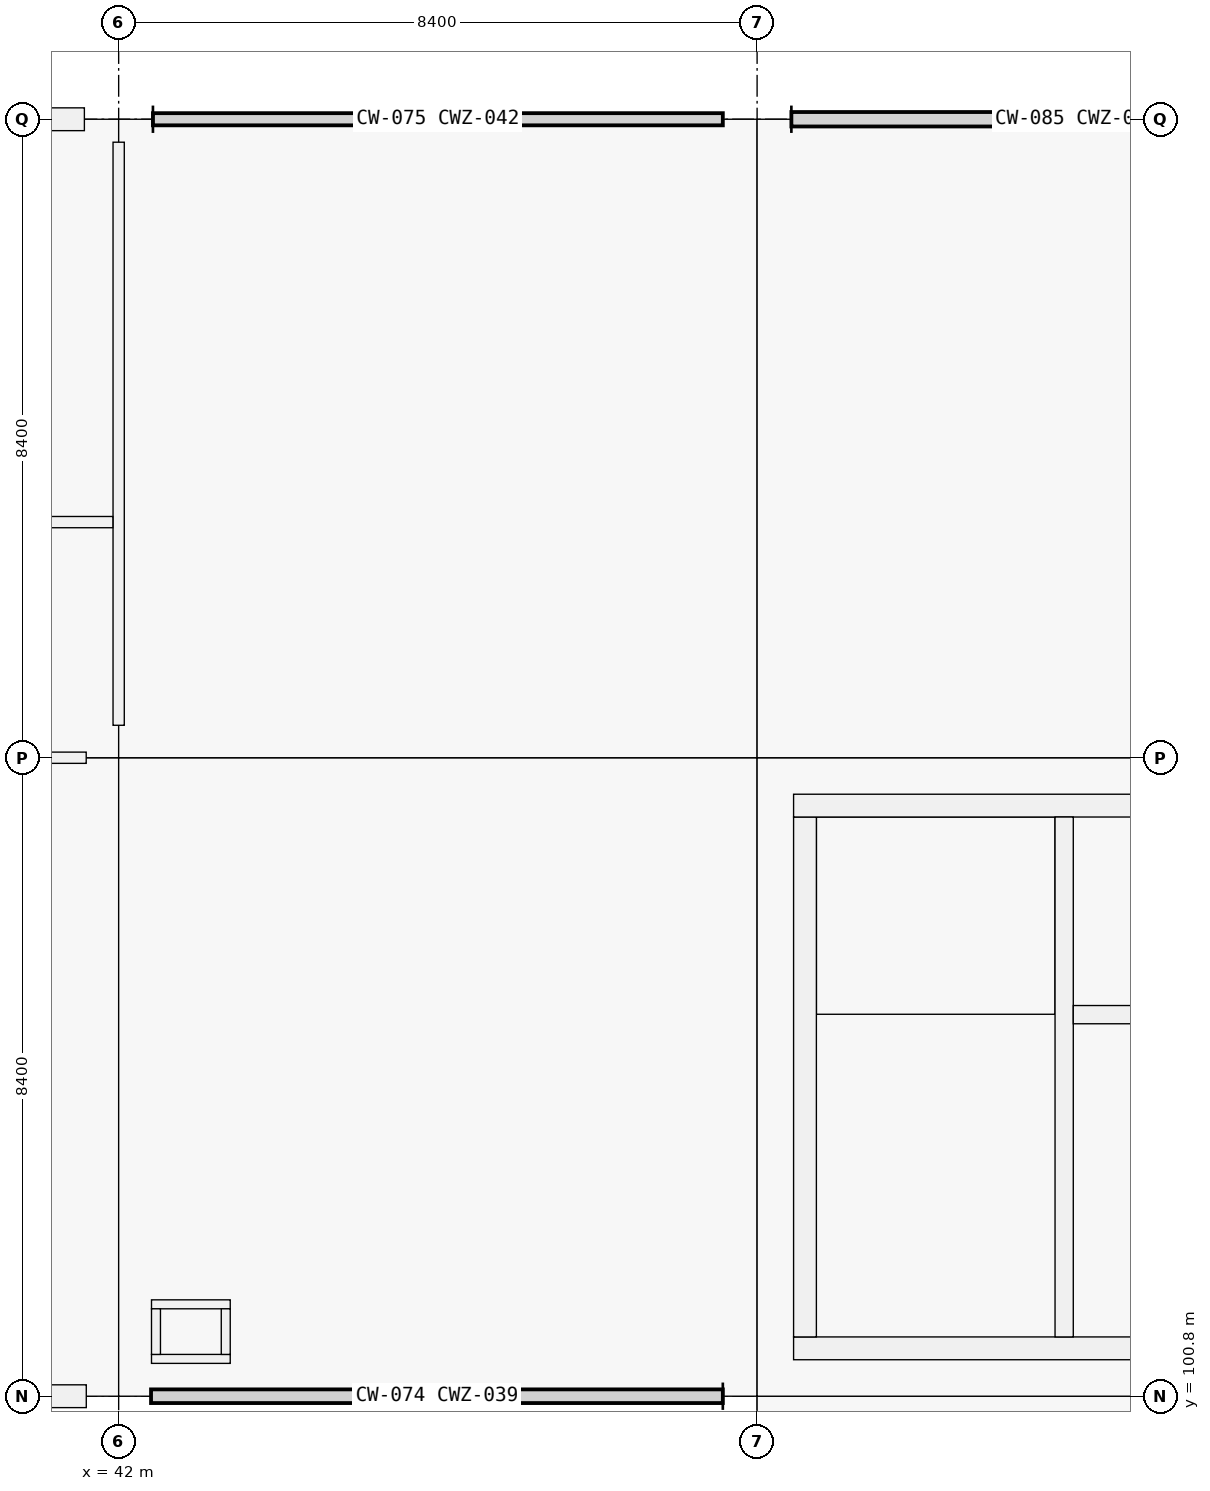
"""IFC4 building model, lengths in metres.
Left out: names, types, materials, properties, quantities, classifications, styles, units other than length and angle.
Written with IfcOpenShell. Run it as: python <this file> out.ifc"""

import sys

from ifc_helpers import new_model, si_unit, direction, frame, frame_2d, origin, origin_2d, place, context, subcontext, project, spatial, rectangle, extrude, element, fill, save


model = new_model("IFC4")
c1 = context("Model", 3, precision=1e-05, world=origin(), true_north=direction((0.0, 1.0)))
c2 = subcontext(c1, "Body", "Model", "MODEL_VIEW")
j1 = project(units=[si_unit("LENGTHUNIT", "METRE"), si_unit("PLANEANGLEUNIT", "RADIAN")], contexts=[c1])
p1 = place(None, origin())
s1 = spatial("IfcSite", under=j1, at=p1, CompositionType="ELEMENT")
p2 = place(p1, origin())
s2 = spatial("IfcBuilding", under=s1, at=p2, CompositionType="ELEMENT")
p3 = place(p2, frame((0.0, 0.0, 5.76)))
s3 = spatial("IfcBuildingStorey", under=s2, at=p3, CompositionType="ELEMENT", Elevation=5.76)
for number, where, z_axis, x_axis in (
    (1, (42.0, 100.8, 0.0), (0.0, 0.0, 1.0), (1.0, 0.0, 0.0)),
    (2, (42.0, 109.2, 0.0), (0.0, 0.0, 1.0), (1.0, 0.0, 0.0)),
):
    element("IfcColumn", number, at=place(p3, frame(where, z_axis=z_axis, x_axis=x_axis)), inside=s3, PredefinedType="COLUMN", context=c2, shape_type="SweptSolid", body=[
        extrude(rectangle(XDim=0.85, YDim=0.85, at=origin_2d()), origin(), (0.0, 0.0, 1.0), 4.5),
    ])
p4 = place(p3, frame((42.0, 117.6, 0.0), z_axis=(0.0, 0.0, 1.0), x_axis=(1.0, 0.0, 0.0)))
e3 = element("IfcColumn", 3, at=p4, inside=s3, PredefinedType="COLUMN", context=c2, shape_type="SweptSolid", body=[
    extrude(rectangle(XDim=0.9, YDim=0.6, at=origin_2d()), origin(), (0.0, 0.0, 1.0), 4.5),
])
for number, where, z_axis, x_axis in (
    (4, (50.4, 100.8, 0.0), (0.0, 0.0, 1.0), (1.0, 0.0, 0.0)),
    (5, (50.4, 109.2, 0.0), (0.0, 0.0, 1.0), (1.0, 0.0, 0.0)),
):
    element("IfcColumn", number, at=place(p3, frame(where, z_axis=z_axis, x_axis=x_axis)), inside=s3, PredefinedType="COLUMN", context=c2, shape_type="SweptSolid", body=[
        extrude(rectangle(XDim=0.9, YDim=0.9, at=origin_2d()), origin(), (0.0, 0.0, 1.0), 4.5),
    ])
p5 = place(p3, frame((50.4, 117.6, 0.0), z_axis=(0.0, 0.0, 1.0), x_axis=(1.0, 0.0, 0.0)))
e6 = element("IfcColumn", 6, at=p5, inside=s3, PredefinedType="COLUMN", context=c2, shape_type="SweptSolid", body=[
    extrude(rectangle(XDim=0.9, YDim=0.6, at=origin_2d()), origin(), (0.0, 0.0, 1.0), 4.5),
])
p6 = place(p3, frame((41.574, 100.8, 0.0), z_axis=(0.0, 0.0, 1.0), x_axis=(-1.0, 0.0, 0.0)))
e7 = element("IfcWall", 7, at=p6, inside=s3, PredefinedType="SOLIDWALL", context=c2, shape_type="SweptSolid", body=[
    extrude(rectangle(XDim=7.598, YDim=0.3, at=frame_2d((3.799, 0.0))), origin(), (0.0, 0.0, 1.0), 3.4),
])
p7 = place(p6, frame((2.824, 0.0, 0.9)))
e8 = element("IfcOpeningElement", 8, at=p7, cuts=e7, PredefinedType="OPENING", context=c2, shape_type="SweptSolid", body=[
    extrude(rectangle(XDim=1.95, YDim=1.6, at=frame_2d((0.975, 0.8))), frame((0.0, 0.15, 0.0), z_axis=(0.0, -1.0, 0.0), x_axis=(1.0, 0.0, 0.0)), (0.0, 0.0, 1.0), 0.3),
])
p8 = place(p3, frame((33.976, 117.6, 0.0), z_axis=(0.0, 0.0, 1.0), x_axis=(1.0, 0.0, 0.0)))
e9 = element("IfcWall", 9, at=p8, inside=s3, PredefinedType="SOLIDWALL", context=c2, shape_type="SweptSolid", body=[
    extrude(rectangle(XDim=7.573, YDim=0.3, at=frame_2d((3.787, 0.0))), origin(), (0.0, 0.0, 1.0), 3.4),
])
p9 = place(p8, frame((2.612, 0.0, 0.9)))
e10 = element("IfcOpeningElement", 10, at=p9, cuts=e9, PredefinedType="OPENING", context=c2, shape_type="SweptSolid", body=[
    extrude(rectangle(XDim=2.35, YDim=1.6, at=frame_2d((1.175, 0.8))), frame((0.0, 0.15, 0.0), z_axis=(0.0, -1.0, 0.0), x_axis=(1.0, 0.0, 0.0)), (0.0, 0.0, 1.0), 0.3),
])
p10 = place(p3, frame((58.32, 101.43, 0.0), z_axis=(0.0, 0.0, 1.0), x_axis=(-1.0, 0.0, 0.0)))
e11 = element("IfcWall", 11, at=p10, inside=s3, PredefinedType="SHEAR", context=c2, shape_type="SweptSolid", body=[
    extrude(rectangle(XDim=7.44, YDim=0.3, at=frame_2d((3.72, 0.0))), origin(), (0.0, 0.0, 1.0), 4.5),
])
p11 = place(p10, frame((1.28, 0.0, 0.0)))
e12 = element("IfcOpeningElement", 12, at=p11, cuts=e11, PredefinedType="OPENING", context=c2, shape_type="SweptSolid", body=[
    extrude(rectangle(XDim=1.5, YDim=2.15, at=frame_2d((0.75, 1.075))), frame((0.0, 0.15, 0.0), z_axis=(0.0, -1.0, 0.0), x_axis=(1.0, 0.0, 0.0)), (0.0, 0.0, 1.0), 0.3),
])
p12 = place(p3, frame((51.03, 101.58, 0.0), z_axis=(0.0, 0.0, 1.0), x_axis=(0.0, 1.0, 0.0)))
e13 = element("IfcWall", 13, at=p12, inside=s3, PredefinedType="SHEAR", context=c2, shape_type="SweptSolid", body=[
    extrude(rectangle(XDim=6.84, YDim=0.3, at=frame_2d((3.42, 0.0))), origin(), (0.0, 0.0, 1.0), 4.5),
])
p13 = place(p3, frame((50.88, 108.57, 0.0), z_axis=(0.0, 0.0, 1.0), x_axis=(1.0, 0.0, 0.0)))
e14 = element("IfcWall", 14, at=p13, inside=s3, PredefinedType="SHEAR", context=c2, shape_type="SweptSolid", body=[
    extrude(rectangle(XDim=7.44, YDim=0.3, at=frame_2d((3.72, 0.0))), origin(), (0.0, 0.0, 1.0), 4.5),
])
p14 = place(p3, frame((54.44, 101.58, 0.0), z_axis=(0.0, 0.0, 1.0), x_axis=(0.0, 1.0, 0.0)))
e15 = element("IfcWall", 15, at=p14, inside=s3, PredefinedType="SHEAR", context=c2, shape_type="SweptSolid", body=[
    extrude(rectangle(XDim=6.84, YDim=0.24, at=frame_2d((3.42, 0.0))), origin(), (0.0, 0.0, 1.0), 4.5),
])
p15 = place(p14, frame((0.12, 0.0, 0.0)))
e16 = element("IfcOpeningElement", 16, at=p15, cuts=e15, PredefinedType="OPENING", context=c2, shape_type="SweptSolid", body=[
    extrude(rectangle(XDim=1.0, YDim=2.15, at=frame_2d((0.5, 1.075))), frame((0.0, 0.12, 0.0), z_axis=(0.0, -1.0, 0.0), x_axis=(1.0, 0.0, 0.0)), (0.0, 0.0, 1.0), 0.24),
])
p16 = place(p3, frame((54.56, 105.82, 0.0), z_axis=(0.0, 0.0, 1.0), x_axis=(1.0, 0.0, 0.0)))
e17 = element("IfcWall", 17, at=p16, inside=s3, PredefinedType="SHEAR", context=c2, shape_type="SweptSolid", body=[
    extrude(rectangle(XDim=3.46, YDim=0.24, at=frame_2d((1.73, 0.0))), origin(), (0.0, 0.0, 1.0), 4.5),
])
p17 = place(p16, frame((1.13, 0.0, 0.0)))
e18 = element("IfcOpeningElement", 18, at=p17, cuts=e17, PredefinedType="OPENING", context=c2, shape_type="SweptSolid", body=[
    extrude(rectangle(XDim=1.2, YDim=2.2, at=frame_2d((0.6, 1.1))), frame((0.0, 0.12, 0.0), z_axis=(0.0, -1.0, 0.0), x_axis=(1.0, 0.0, 0.0)), (0.0, 0.0, 1.0), 0.24),
])
for number, where, z_axis, x_axis in (
    (19, (42.432, 101.291, 0.0), (0.0, 0.0, 1.0), (1.0, 0.0, 0.0)),
    (20, (42.432, 102.009, 0.0), (0.0, 0.0, 1.0), (1.0, 0.0, 0.0)),
):
    element("IfcWall", number, at=place(p3, frame(where, z_axis=z_axis, x_axis=x_axis)), inside=s3, PredefinedType="PARTITIONING", context=c2, shape_type="SweptSolid", body=[
        extrude(rectangle(XDim=1.036, YDim=0.118, at=frame_2d((0.518, 0.0))), origin(), (0.0, 0.0, 1.0), 3.48),
    ])
for number, where, z_axis, x_axis in (
    (21, (42.491, 101.35, 0.0), (0.0, 0.0, 1.0), (0.0, 1.0, 0.0)),
    (22, (43.409, 101.35, 0.0), (0.0, 0.0, 1.0), (0.0, 1.0, 0.0)),
):
    element("IfcWall", number, at=place(p3, frame(where, z_axis=z_axis, x_axis=x_axis)), inside=s3, PredefinedType="PARTITIONING", context=c2, shape_type="SweptSolid", body=[
        extrude(rectangle(XDim=0.6, YDim=0.118, at=frame_2d((0.3, 0.0))), origin(), (0.0, 0.0, 1.0), 3.48),
    ])
p18 = place(p3, frame((33.952, 109.2, 0.0), z_axis=(0.0, 0.0, 1.0), x_axis=(1.0, 0.0, 0.0)))
e23 = element("IfcWall", 23, at=p18, inside=s3, PredefinedType="PARTITIONING", context=c2, shape_type="SweptSolid", body=[
    extrude(rectangle(XDim=7.621, YDim=0.148, at=frame_2d((3.811, 0.0))), origin(), (0.0, 0.0, 1.0), 2.4),
])
p19 = place(p3, frame((42.0, 109.627, 0.0), z_axis=(0.0, 0.0, 1.0), x_axis=(0.0, 1.0, 0.0)))
e24 = element("IfcWall", 24, at=p19, inside=s3, PredefinedType="PARTITIONING", context=c2, shape_type="SweptSolid", body=[
    extrude(rectangle(XDim=7.671, YDim=0.148, at=frame_2d((3.835, 0.0))), origin(), (0.0, 0.0, 1.0), 2.4),
])
p20 = place(p19, frame((0.713, 0.0, 0.0)))
e25 = element("IfcOpeningElement", 25, at=p20, cuts=e24, PredefinedType="OPENING", context=c2, shape_type="SweptSolid", body=[
    extrude(rectangle(XDim=1.1, YDim=2.15, at=frame_2d((0.55, 1.075))), frame((0.0, 0.074, 0.0), z_axis=(0.0, -1.0, 0.0), x_axis=(1.0, 0.0, 0.0)), (0.0, 0.0, 1.0), 0.148),
])
p21 = place(p19, frame((4.658, 0.0, 0.0)))
e26 = element("IfcOpeningElement", 26, at=p21, cuts=e24, PredefinedType="OPENING", context=c2, shape_type="SweptSolid", body=[
    extrude(rectangle(XDim=1.05, YDim=2.15, at=frame_2d((0.525, 1.075))), frame((0.0, 0.074, 0.0), z_axis=(0.0, -1.0, 0.0), x_axis=(1.0, 0.0, 0.0)), (0.0, 0.0, 1.0), 0.148),
])
p22 = place(p3, frame((33.682, 112.3, 0.0), z_axis=(0.0, 0.0, 1.0), x_axis=(1.0, 0.0, 0.0)))
e27 = element("IfcWall", 27, at=p22, inside=s3, PredefinedType="PARTITIONING", context=c2, shape_type="SweptSolid", body=[
    extrude(rectangle(XDim=8.242, YDim=0.148, at=frame_2d((4.121, 0.0))), origin(), (0.0, 0.0, 1.0), 2.4),
])
p23 = place(p15, origin())
e28 = element("IfcDoor", 28, at=p23, inside=s3, OperationType="SINGLE_SWING_RIGHT", PredefinedType="DOOR", context=c2, shape_type="SweptSolid", body=[
    extrude(rectangle(XDim=1.0, YDim=2.15, at=frame_2d((0.5, 1.075))), frame((0.0, 0.025, 0.0), z_axis=(0.0, -1.0, 0.0), x_axis=(1.0, 0.0, 0.0)), (0.0, 0.0, 1.0), 0.05),
])
fill(e16, e28)
p24 = place(p20, origin())
e29 = element("IfcDoor", 29, at=p24, inside=s3, OperationType="SINGLE_SWING_RIGHT", PredefinedType="DOOR", context=c2, shape_type="SweptSolid", body=[
    extrude(rectangle(XDim=1.1, YDim=2.15, at=frame_2d((0.55, 1.075))), frame((0.0, 0.025, 0.0), z_axis=(0.0, -1.0, 0.0), x_axis=(1.0, 0.0, 0.0)), (0.0, 0.0, 1.0), 0.05),
])
fill(e25, e29)
p25 = place(p21, origin())
e30 = element("IfcDoor", 30, at=p25, inside=s3, OperationType="SINGLE_SWING_LEFT", PredefinedType="DOOR", context=c2, shape_type="SweptSolid", body=[
    extrude(rectangle(XDim=1.05, YDim=2.15, at=frame_2d((0.525, 1.075))), frame((0.0, 0.025, 0.0), z_axis=(0.0, -1.0, 0.0), x_axis=(1.0, 0.0, 0.0)), (0.0, 0.0, 1.0), 0.05),
])
fill(e26, e30)
save(model, sys.argv[1])
